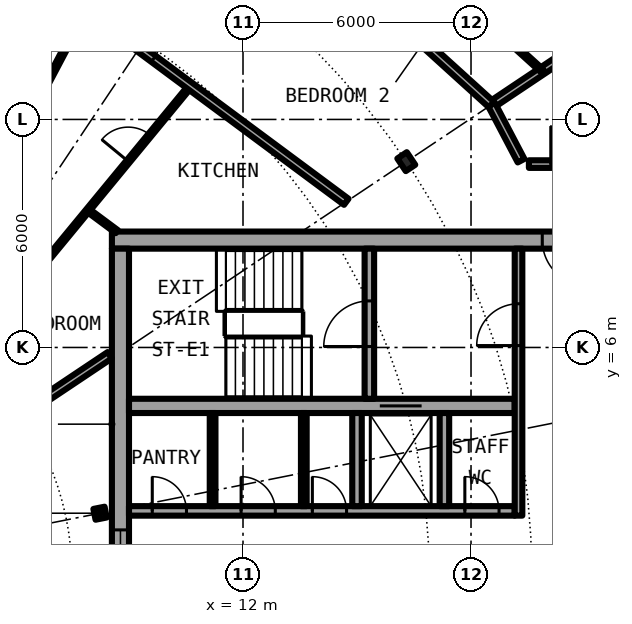
"""IFC4 building model, lengths in metres.
Left out: names, types, materials, properties, quantities, classifications, styles, units other than length and angle.
Written with IfcOpenShell. Run it as: python <this file> out.ifc"""

import sys

from ifc_helpers import new_model, si_unit, direction, frame, frame_2d, origin, origin_2d, place, context, subcontext, project, spatial, rectangle, i_section, extrude, element, fill, save


model = new_model("IFC4")
c1 = context("Model", 3, precision=1e-05, world=origin(), true_north=direction((0.0, 1.0)))
c2 = subcontext(c1, "Body", "Model", "MODEL_VIEW")
j1 = project(units=[si_unit("LENGTHUNIT", "METRE"), si_unit("PLANEANGLEUNIT", "RADIAN")], contexts=[c1])
p1 = place(None, origin())
s1 = spatial("IfcSite", under=j1, at=p1, CompositionType="ELEMENT")
p2 = place(p1, origin())
s2 = spatial("IfcBuilding", under=s1, at=p2, CompositionType="ELEMENT")
p3 = place(p2, frame((0.0, 0.0, 190.2)))
s3 = spatial("IfcBuildingStorey", under=s2, at=p3, CompositionType="ELEMENT", Elevation=190.2)
p4 = place(p3, frame((16.297, 10.889, 0.0), z_axis=(0.0, 0.0, 1.0), x_axis=(0.831469612303, 0.55557023302, 0.0)))
e1 = element("IfcColumn", 1, at=p4, inside=s3, PredefinedType="COLUMN", context=c2, shape_type="SweptSolid", body=[
    extrude(i_section(OverallWidth=0.3, OverallDepth=0.4, WebThickness=0.013, FlangeThickness=0.024, FilletRadius=0.027, at=origin_2d()), origin(), (0.0, 0.0, 1.0), 3.05),
])
p5 = place(p3, frame((8.239, 1.639, 0.0), z_axis=(0.0, 0.0, 1.0), x_axis=(0.980785280403, 0.195090322016, 0.0)))
e2 = element("IfcColumn", 2, at=p5, inside=s3, PredefinedType="COLUMN", context=c2, shape_type="SweptSolid", body=[
    extrude(i_section(OverallWidth=0.3, OverallDepth=0.29, WebThickness=0.009, FlangeThickness=0.014, FilletRadius=0.027, at=origin_2d()), origin(), (0.0, 0.0, 1.0), 3.05),
])
p6 = place(p3, frame((22.05, 8.825, 0.0), z_axis=(0.0, 0.0, 1.0), x_axis=(-1.0, 0.0, 0.0)))
e3 = element("IfcWall", 3, at=p6, inside=s3, PredefinedType="SHEAR", context=c2, shape_type="SweptSolid", body=[
    extrude(rectangle(XDim=13.5, YDim=0.45, at=frame_2d((6.75, 0.0))), origin(), (0.0, 0.0, 1.0), 3.05),
])
p7 = place(p6, frame((0.975, 0.0, 0.0)))
e4 = element("IfcOpeningElement", 4, at=p7, cuts=e3, PredefinedType="OPENING", context=c2, shape_type="SweptSolid", body=[
    extrude(rectangle(XDim=1.2, YDim=2.3, at=frame_2d((0.6, 1.15))), frame((0.0, 0.235, 0.0), z_axis=(0.0, -1.0, 0.0), x_axis=(1.0, 0.0, 0.0)), (0.0, 0.0, 1.0), 0.47),
])
p8 = place(p3, frame((8.775, -8.6, 0.0), z_axis=(0.0, 0.0, 1.0), x_axis=(0.0, 1.0, 0.0)))
e5 = element("IfcWall", 5, at=p8, inside=s3, PredefinedType="SHEAR", context=c2, shape_type="SweptSolid", body=[
    extrude(rectangle(XDim=17.2, YDim=0.45, at=frame_2d((8.6, 0.0))), origin(), (0.0, 0.0, 1.0), 3.05),
])
p9 = place(p8, frame((7.4, 0.0, 0.1)))
e6 = element("IfcOpeningElement", 6, at=p9, cuts=e5, PredefinedType="OPENING", context=c2, shape_type="SweptSolid", body=[
    extrude(rectangle(XDim=2.4, YDim=2.2, at=frame_2d((1.2, 1.1))), frame((0.0, 0.235, 0.0), z_axis=(0.0, -1.0, 0.0), x_axis=(1.0, 0.0, 0.0)), (0.0, 0.0, 1.0), 0.47),
])
p10 = place(p3, frame((9.0, 1.7, 0.0), z_axis=(0.0, 0.0, 1.0), x_axis=(1.0, 0.0, 0.0)))
e7 = element("IfcWall", 7, at=p10, inside=s3, PredefinedType="SHEAR", context=c2, shape_type="SweptSolid", body=[
    extrude(rectangle(XDim=10.15, YDim=0.25, at=frame_2d((5.075, 0.0))), origin(), (0.0, 0.0, 1.0), 3.05),
])
p11 = place(p10, frame((0.613, 0.0, 0.0)))
e8 = element("IfcOpeningElement", 8, at=p11, cuts=e7, PredefinedType="OPENING", context=c2, shape_type="SweptSolid", body=[
    extrude(rectangle(XDim=0.9, YDim=2.3, at=frame_2d((0.45, 1.15))), frame((0.0, 0.135, 0.0), z_axis=(0.0, -1.0, 0.0), x_axis=(1.0, 0.0, 0.0)), (0.0, 0.0, 1.0), 0.27),
])
p12 = place(p10, frame((2.95, 0.0, 0.0)))
e9 = element("IfcOpeningElement", 9, at=p12, cuts=e7, PredefinedType="OPENING", context=c2, shape_type="SweptSolid", body=[
    extrude(rectangle(XDim=0.9, YDim=2.3, at=frame_2d((0.45, 1.15))), frame((0.0, 0.135, 0.0), z_axis=(0.0, -1.0, 0.0), x_axis=(1.0, 0.0, 0.0)), (0.0, 0.0, 1.0), 0.27),
])
p13 = place(p10, frame((4.825, 0.0, 0.0)))
e10 = element("IfcOpeningElement", 10, at=p13, cuts=e7, PredefinedType="OPENING", context=c2, shape_type="SweptSolid", body=[
    extrude(rectangle(XDim=0.9, YDim=2.3, at=frame_2d((0.45, 1.15))), frame((0.0, 0.135, 0.0), z_axis=(0.0, -1.0, 0.0), x_axis=(1.0, 0.0, 0.0)), (0.0, 0.0, 1.0), 0.27),
])
p14 = place(p10, frame((8.837, 0.0, 0.0)))
e11 = element("IfcOpeningElement", 11, at=p14, cuts=e7, PredefinedType="OPENING", context=c2, shape_type="SweptSolid", body=[
    extrude(rectangle(XDim=0.9, YDim=2.3, at=frame_2d((0.45, 1.15))), frame((0.0, 0.135, 0.0), z_axis=(0.0, -1.0, 0.0), x_axis=(1.0, 0.0, 0.0)), (0.0, 0.0, 1.0), 0.27),
])
p15 = place(p3, frame((9.0, 4.462, 0.0), z_axis=(0.0, 0.0, 1.0), x_axis=(1.0, 0.0, 0.0)))
e12 = element("IfcWall", 12, at=p15, inside=s3, PredefinedType="SHEAR", context=c2, shape_type="SweptSolid", body=[
    extrude(rectangle(XDim=10.15, YDim=0.375, at=frame_2d((5.075, 0.0))), origin(), (0.0, 0.0, 1.0), 3.05),
])
p16 = place(p15, frame((6.6, 0.0, 0.0)))
e13 = element("IfcOpeningElement", 13, at=p16, cuts=e12, PredefinedType="OPENING", context=c2, shape_type="SweptSolid", body=[
    extrude(rectangle(XDim=1.1, YDim=2.3, at=frame_2d((0.55, 1.15))), frame((0.0, 0.198, 0.0), z_axis=(0.0, -1.0, 0.0), x_axis=(1.0, 0.0, 0.0)), (0.0, 0.0, 1.0), 0.395),
])
p17 = place(p3, frame((15.325, 4.65, 0.0), z_axis=(0.0, 0.0, 1.0), x_axis=(0.0, 1.0, 0.0)))
e14 = element("IfcWall", 14, at=p17, inside=s3, PredefinedType="SHEAR", context=c2, shape_type="SweptSolid", body=[
    extrude(rectangle(XDim=3.95, YDim=0.25, at=frame_2d((1.975, 0.0))), origin(), (0.0, 0.0, 1.0), 3.05),
])
p18 = place(p17, frame((1.375, 0.0, 0.0)))
e15 = element("IfcOpeningElement", 15, at=p18, cuts=e14, PredefinedType="OPENING", context=c2, shape_type="SweptSolid", body=[
    extrude(rectangle(XDim=1.2, YDim=2.3, at=frame_2d((0.6, 1.15))), frame((0.0, 0.135, 0.0), z_axis=(0.0, -1.0, 0.0), x_axis=(1.0, 0.0, 0.0)), (0.0, 0.0, 1.0), 0.27),
])
for number, where, z_axis, x_axis in (
    (16, (15.0, 1.825, 0.0), (0.0, 0.0, 1.0), (0.0, 1.0, 0.0)),
    (17, (17.3, 1.825, 0.0), (0.0, 0.0, 1.0), (0.0, 1.0, 0.0)),
):
    element("IfcWall", number, at=place(p3, frame(where, z_axis=z_axis, x_axis=x_axis)), inside=s3, PredefinedType="SOLIDWALL", context=c2, shape_type="SweptSolid", body=[
        extrude(rectangle(XDim=2.45, YDim=0.25, at=frame_2d((1.225, 0.0))), origin(), (0.0, 0.0, 1.0), 2.7),
    ])
p19 = place(p3, frame((19.25, 1.575, 0.0), z_axis=(0.0, 0.0, 1.0), x_axis=(0.0, 1.0, 0.0)))
e18 = element("IfcWall", 18, at=p19, inside=s3, PredefinedType="SOLIDWALL", context=c2, shape_type="SweptSolid", body=[
    extrude(rectangle(XDim=7.025, YDim=0.2, at=frame_2d((3.513, 0.0))), origin(), (0.0, 0.0, 1.0), 2.7),
])
p20 = place(p19, frame((4.475, 0.0, 0.0)))
e19 = element("IfcOpeningElement", 19, at=p20, cuts=e18, PredefinedType="OPENING", context=c2, shape_type="SweptSolid", body=[
    extrude(rectangle(XDim=1.1, YDim=2.3, at=frame_2d((0.55, 1.15))), frame((0.0, 0.11, 0.0), z_axis=(0.0, -1.0, 0.0), x_axis=(1.0, 0.0, 0.0)), (0.0, 0.0, 1.0), 0.22),
])
for number, where, z_axis, x_axis in (
    (20, (11.2, 1.825, 0.0), (0.0, 0.0, 1.0), (0.0, 1.0, 0.0)),
    (21, (13.6, 1.825, 0.0), (0.0, 0.0, 1.0), (0.0, 1.0, 0.0)),
):
    element("IfcWall", number, at=place(p3, frame(where, z_axis=z_axis, x_axis=x_axis)), inside=s3, PredefinedType="PARTITIONING", context=c2, shape_type="SweptSolid", body=[
        extrude(rectangle(XDim=2.45, YDim=0.15, at=frame_2d((1.225, 0.0))), origin(), (0.0, 0.0, 1.0), 2.7),
    ])
p21 = place(p3, frame((4.909, 5.958, 0.0), z_axis=(0.0, 0.0, 1.0), x_axis=(0.635879010442, 0.771788756124, 0.0)))
e22 = element("IfcWall", 22, at=p21, inside=s3, PredefinedType="PARTITIONING", context=c2, shape_type="SweptSolid", body=[
    extrude(rectangle(XDim=8.967, YDim=0.1, at=frame_2d((4.484, 0.0))), origin(), (0.0, 0.0, 1.0), 2.7),
])
p22 = place(p21, frame((6.4, 0.0, 0.0)))
e23 = element("IfcOpeningElement", 23, at=p22, cuts=e22, PredefinedType="OPENING", context=c2, shape_type="SweptSolid", body=[
    extrude(rectangle(XDim=0.9, YDim=2.3, at=frame_2d((0.45, 1.15))), frame((0.0, 0.06, 0.0), z_axis=(0.0, -1.0, 0.0), x_axis=(1.0, 0.0, 0.0)), (0.0, 0.0, 1.0), 0.12),
])
p23 = place(p21, frame((1.917, 0.0, 0.0)))
e24 = element("IfcOpeningElement", 24, at=p23, cuts=e22, PredefinedType="OPENING", context=c2, shape_type="SweptSolid", body=[
    extrude(rectangle(XDim=0.9, YDim=2.3, at=frame_2d((0.45, 1.15))), frame((0.0, 0.06, 0.0), z_axis=(0.0, -1.0, 0.0), x_axis=(1.0, 0.0, 0.0)), (0.0, 0.0, 1.0), 0.12),
])
p24 = place(p3, frame((5.877, 11.125, 0.0), z_axis=(0.0, 0.0, 1.0), x_axis=(0.467030118529, 0.884241408432, 0.0)))
e25 = element("IfcWall", 25, at=p24, inside=s3, PredefinedType="PARTITIONING", context=c2, shape_type="SweptSolid", body=[
    extrude(rectangle(XDim=4.278, YDim=0.1, at=frame_2d((2.139, 0.0))), origin(), (0.0, 0.0, 1.0), 2.7),
])
p25 = place(p24, frame((1.689, 0.0, 0.0)))
e26 = element("IfcOpeningElement", 26, at=p25, cuts=e25, PredefinedType="OPENING", context=c2, shape_type="SweptSolid", body=[
    extrude(rectangle(XDim=0.9, YDim=2.3, at=frame_2d((0.45, 1.15))), frame((0.0, 0.06, 0.0), z_axis=(0.0, -1.0, 0.0), x_axis=(1.0, 0.0, 0.0)), (0.0, 0.0, 1.0), 0.12),
])
p26 = place(p3, frame((18.542, 12.389, 0.0), z_axis=(0.0, 0.0, 1.0), x_axis=(0.831387096605, 0.55569370664, 0.0)))
e27 = element("IfcWall", 27, at=p26, inside=s3, PredefinedType="PARTITIONING", context=c2, shape_type="SweptSolid", body=[
    extrude(rectangle(XDim=4.875, YDim=0.2, at=frame_2d((2.438, 0.0))), origin(), (0.0, 0.0, 1.0), 2.7),
])
p27 = place(p3, frame((6.513, 4.472, 0.0), z_axis=(0.0, 0.0, 1.0), x_axis=(0.831403409976, 0.555669299026, 0.0)))
e28 = element("IfcWall", 28, at=p27, inside=s3, PredefinedType="PARTITIONING", context=c2, shape_type="SweptSolid", body=[
    extrude(rectangle(XDim=2.383, YDim=0.2, at=frame_2d((1.191, 0.0))), origin(), (0.0, 0.0, 1.0), 2.7),
])
p28 = place(p3, frame((19.523, 10.825, 0.0), z_axis=(0.0, 0.0, 1.0), x_axis=(1.0, 0.0, 0.0)))
e29 = element("IfcWall", 29, at=p28, inside=s3, PredefinedType="PARTITIONING", context=c2, shape_type="SweptSolid", body=[
    extrude(rectangle(XDim=2.152, YDim=0.2, at=frame_2d((1.076, 0.0))), origin(), (0.0, 0.0, 1.0), 2.7),
])
p29 = place(p28, frame((0.576, 0.0, 0.0)))
e30 = element("IfcOpeningElement", 30, at=p29, cuts=e29, PredefinedType="OPENING", context=c2, shape_type="SweptSolid", body=[
    extrude(rectangle(XDim=1.0, YDim=2.3, at=frame_2d((0.5, 1.15))), frame((0.0, 0.11, 0.0), z_axis=(0.0, -1.0, 0.0), x_axis=(1.0, 0.0, 0.0)), (0.0, 0.0, 1.0), 0.22),
])
p30 = place(p3, frame((7.922, 9.609, 0.0), z_axis=(0.0, 0.0, 1.0), x_axis=(0.802974061841, -0.596013972999, 0.0)))
e31 = element("IfcWall", 31, at=p30, inside=s3, PredefinedType="PARTITIONING", context=c2, shape_type="SweptSolid", body=[
    extrude(rectangle(XDim=0.943, YDim=0.1, at=frame_2d((0.471, 0.0))), origin(), (0.0, 0.0, 1.0), 2.7),
])
p31 = place(p3, frame((5.137, 16.938, 0.0), z_axis=(0.0, 0.0, 1.0), x_axis=(0.803240181354, -0.595655278712, 0.0)))
e32 = element("IfcWall", 32, at=p31, inside=s3, PredefinedType="PARTITIONING", context=c2, shape_type="SweptSolid", body=[
    extrude(rectangle(XDim=11.928, YDim=0.2, at=frame_2d((5.964, 0.0))), origin(), (0.0, 0.0, 1.0), 2.7),
])
p32 = place(p31, frame((4.612, 0.0, 0.0)))
e33 = element("IfcOpeningElement", 33, at=p32, cuts=e32, PredefinedType="OPENING", context=c2, shape_type="SweptSolid", body=[
    extrude(rectangle(XDim=1.0, YDim=2.3, at=frame_2d((0.5, 1.15))), frame((0.0, 0.11, 0.0), z_axis=(0.0, -1.0, 0.0), x_axis=(1.0, 0.0, 0.0)), (0.0, 0.0, 1.0), 0.22),
])
p33 = place(p3, frame((10.512, 19.667, 0.0), z_axis=(0.0, 0.0, 1.0), x_axis=(0.740853508928, -0.671666642248, 0.0)))
e34 = element("IfcWall", 34, at=p33, inside=s3, PredefinedType="PARTITIONING", context=c2, shape_type="SweptSolid", body=[
    extrude(rectangle(XDim=10.84, YDim=0.2, at=frame_2d((5.42, 0.0))), origin(), (0.0, 0.0, 1.0), 2.7),
])
p34 = place(p33, frame((3.293, 0.0, 0.0)))
e35 = element("IfcOpeningElement", 35, at=p34, cuts=e34, PredefinedType="OPENING", context=c2, shape_type="SweptSolid", body=[
    extrude(rectangle(XDim=1.0, YDim=2.3, at=frame_2d((0.5, 1.15))), frame((0.0, 0.11, 0.0), z_axis=(0.0, -1.0, 0.0), x_axis=(1.0, 0.0, 0.0)), (0.0, 0.0, 1.0), 0.22),
])
p35 = place(p3, frame((18.542, 12.389, 0.0), z_axis=(0.0, 0.0, 1.0), x_axis=(0.465359652486, -0.885121683068, 0.0)))
e36 = element("IfcWall", 36, at=p35, inside=s3, PredefinedType="PARTITIONING", context=c2, shape_type="SweptSolid", body=[
    extrude(rectangle(XDim=1.665, YDim=0.2, at=frame_2d((0.833, 0.0))), origin(), (0.0, 0.0, 1.0), 2.7),
])
p36 = place(p3, frame((14.709, 17.958, 0.0), z_axis=(0.0, 0.0, 1.0), x_axis=(0.740923753351, -0.671589153962, 0.0)))
e37 = element("IfcWall", 37, at=p36, inside=s3, PredefinedType="PARTITIONING", context=c2, shape_type="SweptSolid", body=[
    extrude(rectangle(XDim=6.969, YDim=0.1, at=frame_2d((3.484, 0.0))), origin(), (0.0, 0.0, 1.0), 2.7),
])
p37 = place(p36, frame((3.034, 0.0, 0.0)))
e38 = element("IfcOpeningElement", 38, at=p37, cuts=e37, PredefinedType="OPENING", context=c2, shape_type="SweptSolid", body=[
    extrude(rectangle(XDim=0.9, YDim=2.3, at=frame_2d((0.45, 1.15))), frame((0.0, 0.06, 0.0), z_axis=(0.0, -1.0, 0.0), x_axis=(1.0, 0.0, 0.0)), (0.0, 0.0, 1.0), 0.12),
])
p38 = place(p16, origin())
e39 = element("IfcDoor", 39, at=p38, inside=s3, OperationType="DOUBLE_DOOR_SLIDING", PredefinedType="DOOR", context=c2, shape_type="SweptSolid", body=[
    extrude(rectangle(XDim=1.1, YDim=2.3, at=frame_2d((0.55, 1.15))), frame((0.0, 0.025, 0.0), z_axis=(0.0, -1.0, 0.0), x_axis=(1.0, 0.0, 0.0)), (0.0, 0.0, 1.0), 0.05),
])
fill(e13, e39)
p39 = place(p11, origin())
e40 = element("IfcDoor", 40, at=p39, inside=s3, OperationType="SINGLE_SWING_RIGHT", PredefinedType="DOOR", context=c2, shape_type="SweptSolid", body=[
    extrude(rectangle(XDim=0.9, YDim=2.3, at=frame_2d((0.45, 1.15))), frame((0.0, 0.025, 0.0), z_axis=(0.0, -1.0, 0.0), x_axis=(1.0, 0.0, 0.0)), (0.0, 0.0, 1.0), 0.05),
])
fill(e8, e40)
p40 = place(p12, origin())
e41 = element("IfcDoor", 41, at=p40, inside=s3, OperationType="SINGLE_SWING_RIGHT", PredefinedType="DOOR", context=c2, shape_type="SweptSolid", body=[
    extrude(rectangle(XDim=0.9, YDim=2.3, at=frame_2d((0.45, 1.15))), frame((0.0, 0.025, 0.0), z_axis=(0.0, -1.0, 0.0), x_axis=(1.0, 0.0, 0.0)), (0.0, 0.0, 1.0), 0.05),
])
fill(e9, e41)
p41 = place(p13, origin())
e42 = element("IfcDoor", 42, at=p41, inside=s3, OperationType="SINGLE_SWING_LEFT", PredefinedType="DOOR", context=c2, shape_type="SweptSolid", body=[
    extrude(rectangle(XDim=0.9, YDim=2.3, at=frame_2d((0.45, 1.15))), frame((0.0, 0.025, 0.0), z_axis=(0.0, -1.0, 0.0), x_axis=(1.0, 0.0, 0.0)), (0.0, 0.0, 1.0), 0.05),
])
fill(e10, e42)
p42 = place(p14, origin())
e43 = element("IfcDoor", 43, at=p42, inside=s3, OperationType="SINGLE_SWING_LEFT", PredefinedType="DOOR", context=c2, shape_type="SweptSolid", body=[
    extrude(rectangle(XDim=0.9, YDim=2.3, at=frame_2d((0.45, 1.15))), frame((0.0, 0.025, 0.0), z_axis=(0.0, -1.0, 0.0), x_axis=(1.0, 0.0, 0.0)), (0.0, 0.0, 1.0), 0.05),
])
fill(e11, e43)
p43 = place(p18, origin())
e44 = element("IfcDoor", 44, at=p43, inside=s3, OperationType="SINGLE_SWING_LEFT", PredefinedType="DOOR", context=c2, shape_type="SweptSolid", body=[
    extrude(rectangle(XDim=1.2, YDim=2.3, at=frame_2d((0.6, 1.15))), frame((0.0, 0.025, 0.0), z_axis=(0.0, -1.0, 0.0), x_axis=(1.0, 0.0, 0.0)), (0.0, 0.0, 1.0), 0.05),
])
fill(e15, e44)
p44 = place(p20, origin())
e45 = element("IfcDoor", 45, at=p44, inside=s3, OperationType="SINGLE_SWING_LEFT", PredefinedType="DOOR", context=c2, shape_type="SweptSolid", body=[
    extrude(rectangle(XDim=1.1, YDim=2.3, at=frame_2d((0.55, 1.15))), frame((0.0, 0.025, 0.0), z_axis=(0.0, -1.0, 0.0), x_axis=(1.0, 0.0, 0.0)), (0.0, 0.0, 1.0), 0.05),
])
fill(e19, e45)
p45 = place(p7, origin())
e46 = element("IfcDoor", 46, at=p45, inside=s3, OperationType="SINGLE_SWING_RIGHT", PredefinedType="DOOR", context=c2, shape_type="SweptSolid", body=[
    extrude(rectangle(XDim=1.2, YDim=2.3, at=frame_2d((0.6, 1.15))), frame((0.0, 0.025, 0.0), z_axis=(0.0, -1.0, 0.0), x_axis=(1.0, 0.0, 0.0)), (0.0, 0.0, 1.0), 0.05),
])
fill(e4, e46)
p46 = place(p9, origin())
e47 = element("IfcWindow", 47, at=p46, inside=s3, PartitioningType="SINGLE_PANEL", PredefinedType="WINDOW", context=c2, shape_type="SweptSolid", body=[
    extrude(rectangle(XDim=2.4, YDim=2.2, at=frame_2d((1.2, 1.1))), frame((0.0, 0.03, 0.0), z_axis=(0.0, -1.0, 0.0), x_axis=(1.0, 0.0, 0.0)), (0.0, 0.0, 1.0), 0.06),
])
fill(e6, e47)
p47 = place(p32, origin())
e48 = element("IfcDoor", 48, at=p47, inside=s3, OperationType="SINGLE_SWING_LEFT", PredefinedType="DOOR", context=c2, shape_type="SweptSolid", body=[
    extrude(rectangle(XDim=1.0, YDim=2.3, at=frame_2d((0.5, 1.15))), frame((0.0, 0.025, 0.0), z_axis=(0.0, -1.0, 0.0), x_axis=(1.0, 0.0, 0.0)), (0.0, 0.0, 1.0), 0.05),
])
fill(e33, e48)
p48 = place(p25, origin())
e49 = element("IfcDoor", 49, at=p48, inside=s3, OperationType="SINGLE_SWING_RIGHT", PredefinedType="DOOR", context=c2, shape_type="SweptSolid", body=[
    extrude(rectangle(XDim=0.9, YDim=2.3, at=frame_2d((0.45, 1.15))), frame((0.0, 0.025, 0.0), z_axis=(0.0, -1.0, 0.0), x_axis=(1.0, 0.0, 0.0)), (0.0, 0.0, 1.0), 0.05),
])
fill(e26, e49)
p49 = place(p22, origin())
e50 = element("IfcDoor", 50, at=p49, inside=s3, OperationType="SINGLE_SWING_RIGHT", PredefinedType="DOOR", context=c2, shape_type="SweptSolid", body=[
    extrude(rectangle(XDim=0.9, YDim=2.3, at=frame_2d((0.45, 1.15))), frame((0.0, 0.025, 0.0), z_axis=(0.0, -1.0, 0.0), x_axis=(1.0, 0.0, 0.0)), (0.0, 0.0, 1.0), 0.05),
])
fill(e23, e50)
p50 = place(p29, origin())
e51 = element("IfcDoor", 51, at=p50, inside=s3, OperationType="SINGLE_SWING_LEFT", PredefinedType="DOOR", context=c2, shape_type="SweptSolid", body=[
    extrude(rectangle(XDim=1.0, YDim=2.3, at=frame_2d((0.5, 1.15))), frame((0.0, 0.025, 0.0), z_axis=(0.0, -1.0, 0.0), x_axis=(1.0, 0.0, 0.0)), (0.0, 0.0, 1.0), 0.05),
])
fill(e30, e51)
save(model, sys.argv[1])
